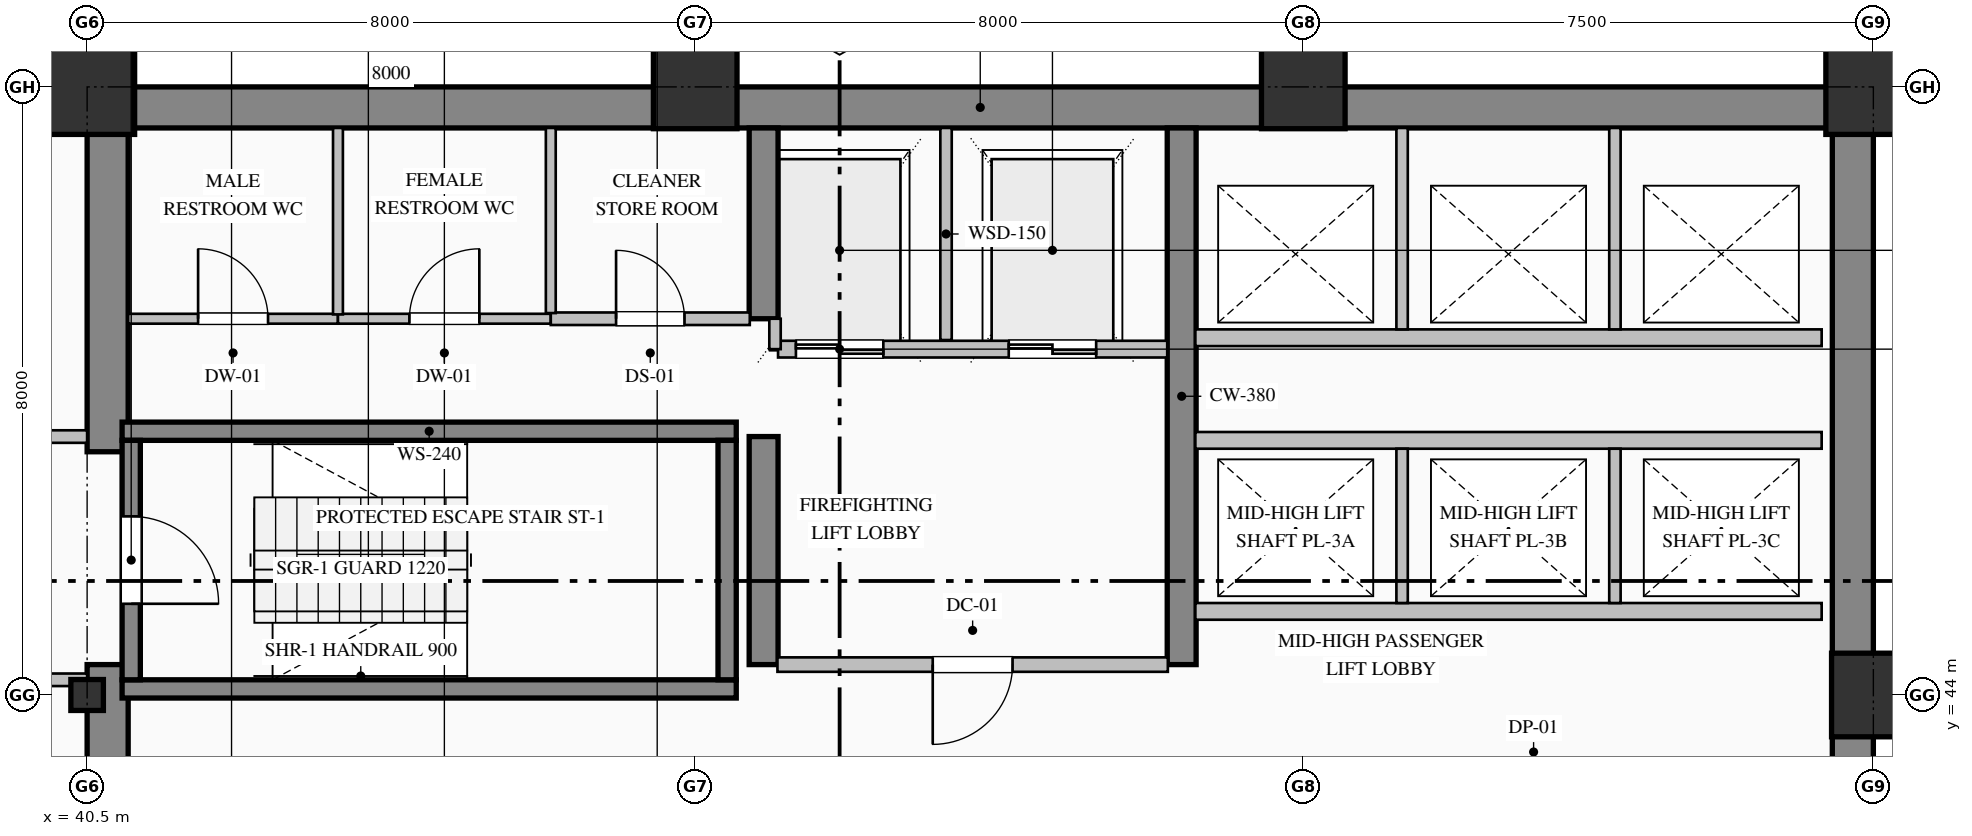
"""IFC4 building model, lengths in metres.
Left out: names, types, materials, properties, quantities, classifications, styles, units other than length and angle.
Written with IfcOpenShell. Run it as: python <this file> out.ifc"""

import sys

from ifc_helpers import new_model, si_unit, direction, frame, frame_2d, origin, origin_2d, place, context, subcontext, project, spatial, rectangle, hollow_rectangle, i_section, extrude, element, fill, save


model = new_model("IFC4")
c1 = context("Model", 3, precision=1e-05, world=origin(), true_north=direction((0.0, 1.0)))
c2 = subcontext(c1, "Body", "Model", "MODEL_VIEW")
j1 = project(units=[si_unit("LENGTHUNIT", "METRE"), si_unit("PLANEANGLEUNIT", "RADIAN")], contexts=[c1])
p1 = place(None, origin())
s1 = spatial("IfcSite", under=j1, at=p1, CompositionType="ELEMENT")
p2 = place(p1, origin())
s2 = spatial("IfcBuilding", under=s1, at=p2, CompositionType="ELEMENT")
p3 = place(p2, frame((0.0, 0.0, 104.2)))
s3 = spatial("IfcBuildingStorey", under=s2, at=p3, CompositionType="ELEMENT", Elevation=104.2)
p4 = place(p3, frame((40.5, 51.73, 0.0), z_axis=(0.0, 0.0, 1.0), x_axis=(1.0, 0.0, 0.0)))
e1 = element("IfcWall", 1, at=p4, inside=s3, PredefinedType="SHEAR", context=c2, shape_type="SweptSolid", body=[
    extrude(rectangle(XDim=23.5, YDim=0.54, at=frame_2d((11.75, 0.0))), origin(), (0.0, 0.0, 1.0), 3.65),
])
p5 = place(p3, frame((63.73, 36.32, 0.0), z_axis=(0.0, 0.0, 1.0), x_axis=(0.0, 1.0, 0.0)))
e2 = element("IfcWall", 2, at=p5, inside=s3, PredefinedType="SHEAR", context=c2, shape_type="SweptSolid", body=[
    extrude(rectangle(XDim=15.14, YDim=0.54, at=frame_2d((7.57, 0.0))), origin(), (0.0, 0.0, 1.0), 3.65),
])
p6 = place(p3, frame((40.77, 36.54, 0.0), z_axis=(0.0, 0.0, 1.0), x_axis=(0.0, 1.0, 0.0)))
e3 = element("IfcWall", 3, at=p6, inside=s3, PredefinedType="SHEAR", context=c2, shape_type="SweptSolid", body=[
    extrude(rectangle(XDim=7.86, YDim=0.54, at=frame_2d((3.93, 0.0))), origin(), (0.0, 0.0, 1.0), 3.65),
])
p7 = place(p3, frame((40.77, 47.2, 0.0), z_axis=(0.0, 0.0, 1.0), x_axis=(0.0, 1.0, 0.0)))
e4 = element("IfcWall", 4, at=p7, inside=s3, PredefinedType="SHEAR", context=c2, shape_type="SweptSolid", body=[
    extrude(rectangle(XDim=4.26, YDim=0.54, at=frame_2d((2.13, 0.0))), origin(), (0.0, 0.0, 1.0), 3.65),
])
p8 = place(p3, frame((49.4, 44.4, 0.0), z_axis=(0.0, 0.0, 1.0), x_axis=(0.0, 1.0, 0.0)))
e5 = element("IfcWall", 5, at=p8, inside=s3, PredefinedType="SHEAR", context=c2, shape_type="SweptSolid", body=[
    extrude(rectangle(XDim=3.0, YDim=0.38, at=frame_2d((1.5, 0.0))), origin(), (0.0, 0.0, 1.0), 3.65),
])
p9 = place(p3, frame((49.4, 48.95, 0.0), z_axis=(0.0, 0.0, 1.0), x_axis=(0.0, 1.0, 0.0)))
e6 = element("IfcWall", 6, at=p9, inside=s3, PredefinedType="SHEAR", context=c2, shape_type="SweptSolid", body=[
    extrude(rectangle(XDim=2.51, YDim=0.38, at=frame_2d((1.255, 0.0))), origin(), (0.0, 0.0, 1.0), 3.65),
])
p10 = place(p3, frame((54.9, 44.4, 0.0), z_axis=(0.0, 0.0, 1.0), x_axis=(0.0, 1.0, 0.0)))
e7 = element("IfcWall", 7, at=p10, inside=s3, PredefinedType="SHEAR", context=c2, shape_type="SweptSolid", body=[
    extrude(rectangle(XDim=7.06, YDim=0.38, at=frame_2d((3.53, 0.0))), origin(), (0.0, 0.0, 1.0), 3.65),
])
p11 = place(p3, frame((40.5, 44.0, 0.0), z_axis=(0.0, 0.0, 1.0), x_axis=(1.0, 0.0, 0.0)))
e8 = element("IfcColumn", 8, at=p11, inside=s3, PredefinedType="COLUMN", context=c2, shape_type="SweptSolid", body=[
    extrude(i_section(OverallWidth=0.407, OverallDepth=0.428, WebThickness=0.02, FlangeThickness=0.035, FilletRadius=0.022, at=origin_2d()), origin(), (0.0, 0.0, 1.0), 4.0),
])
p12 = place(p3, frame((40.5, 52.0, 0.0), z_axis=(0.0, 0.0, 1.0), x_axis=(1.0, 0.0, 0.0)))
e9 = element("IfcColumn", 9, at=p12, inside=s3, PredefinedType="COLUMN", context=c2, shape_type="SweptSolid", body=[
    extrude(hollow_rectangle(XDim=1.25, YDim=1.25, WallThickness=0.045, at=origin_2d()), origin(), (0.0, 0.0, 1.0), 4.0),
])
for number, where, z_axis, x_axis in (
    (10, (48.5, 52.0, 0.0), (0.0, 0.0, 1.0), (1.0, 0.0, 0.0)),
    (11, (56.5, 52.0, 0.0), (0.0, 0.0, 1.0), (1.0, 0.0, 0.0)),
    (12, (64.0, 44.0, 0.0), (0.0, 0.0, 1.0), (1.0, 0.0, 0.0)),
):
    element("IfcColumn", number, at=place(p3, frame(where, z_axis=z_axis, x_axis=x_axis)), inside=s3, PredefinedType="COLUMN", context=c2, shape_type="SweptSolid", body=[
        extrude(hollow_rectangle(XDim=1.1, YDim=1.1, WallThickness=0.04, at=origin_2d()), origin(), (0.0, 0.0, 1.0), 4.0),
    ])
p13 = place(p3, frame((64.0, 52.0, 0.0), z_axis=(0.0, 0.0, 1.0), x_axis=(1.0, 0.0, 0.0)))
e13 = element("IfcColumn", 13, at=p13, inside=s3, PredefinedType="COLUMN", context=c2, shape_type="SweptSolid", body=[
    extrude(hollow_rectangle(XDim=1.25, YDim=1.25, WallThickness=0.045, at=origin_2d()), origin(), (0.0, 0.0, 1.0), 4.0),
])
p14 = place(p3, frame((4.0, 51.82, 0.0), z_axis=(0.0, 0.0, 1.0), x_axis=(1.0, 0.0, 0.0)))
e14 = element("IfcWall", 14, at=p14, inside=s3, PredefinedType="SOLIDWALL", context=c2, shape_type="SweptSolid", body=[
    extrude(rectangle(XDim=36.52, YDim=0.36, at=frame_2d((18.26, 0.0))), origin(), (0.0, 0.0, 1.0), 3.15),
])
p15 = place(p14, frame((6.15, 0.0, 0.85)))
e15 = element("IfcOpeningElement", 15, at=p15, cuts=e14, PredefinedType="OPENING", context=c2, shape_type="SweptSolid", body=[
    extrude(rectangle(XDim=2.1, YDim=2.05, at=frame_2d((1.05, 1.025))), frame((0.0, 0.19, 0.0), z_axis=(0.0, -1.0, 0.0), x_axis=(1.0, 0.0, 0.0)), (0.0, 0.0, 1.0), 0.38),
])
p16 = place(p14, frame((10.2, 0.0, 0.7)))
e16 = element("IfcOpeningElement", 16, at=p16, cuts=e14, PredefinedType="OPENING", context=c2, shape_type="SweptSolid", body=[
    extrude(rectangle(XDim=1.2, YDim=1.85, at=frame_2d((0.6, 0.925))), frame((0.0, 0.19, 0.0), z_axis=(0.0, -1.0, 0.0), x_axis=(1.0, 0.0, 0.0)), (0.0, 0.0, 1.0), 0.38),
])
p17 = place(p14, frame((16.95, 0.0, 0.85)))
e17 = element("IfcOpeningElement", 17, at=p17, cuts=e14, PredefinedType="OPENING", context=c2, shape_type="SweptSolid", body=[
    extrude(rectangle(XDim=2.1, YDim=2.05, at=frame_2d((1.05, 1.025))), frame((0.0, 0.19, 0.0), z_axis=(0.0, -1.0, 0.0), x_axis=(1.0, 0.0, 0.0)), (0.0, 0.0, 1.0), 0.38),
])
p18 = place(p14, frame((31.8, 0.0, 0.7)))
e18 = element("IfcOpeningElement", 18, at=p18, cuts=e14, PredefinedType="OPENING", context=c2, shape_type="SweptSolid", body=[
    extrude(rectangle(XDim=1.2, YDim=1.85, at=frame_2d((0.6, 0.925))), frame((0.0, 0.19, 0.0), z_axis=(0.0, -1.0, 0.0), x_axis=(1.0, 0.0, 0.0)), (0.0, 0.0, 1.0), 0.38),
])
for number, where, z_axis, x_axis in (
    (19, (40.96, 47.47, 0.0), (0.0, 0.0, 1.0), (1.0, 0.0, 0.0)),
    (20, (49.04, 44.08, 0.0), (0.0, 0.0, 1.0), (-1.0, 0.0, 0.0)),
):
    element("IfcWall", number, at=place(p3, frame(where, z_axis=z_axis, x_axis=x_axis)), inside=s3, PredefinedType="SOLIDWALL", context=c2, shape_type="SweptSolid", body=[
        extrude(rectangle(XDim=8.08, YDim=0.24, at=frame_2d((4.04, 0.0))), origin(), (0.0, 0.0, 1.0), 4.0),
    ])
p19 = place(p3, frame((41.08, 47.35, 0.0), z_axis=(0.0, 0.0, 1.0), x_axis=(0.0, -1.0, 0.0)))
e21 = element("IfcWall", 21, at=p19, inside=s3, PredefinedType="SOLIDWALL", context=c2, shape_type="SweptSolid", body=[
    extrude(rectangle(XDim=3.15, YDim=0.24, at=frame_2d((1.575, 0.0))), origin(), (0.0, 0.0, 1.0), 4.0),
])
p20 = place(p19, frame((1.0, 0.0, 0.0)))
e22 = element("IfcOpeningElement", 22, at=p20, cuts=e21, PredefinedType="OPENING", context=c2, shape_type="SweptSolid", body=[
    extrude(rectangle(XDim=1.15, YDim=2.2, at=frame_2d((0.575, 1.1))), frame((0.0, 0.13, 0.0), z_axis=(0.0, -1.0, 0.0), x_axis=(1.0, 0.0, 0.0)), (0.0, 0.0, 1.0), 0.26),
])
p21 = place(p3, frame((48.92, 44.2, 0.0), z_axis=(0.0, 0.0, 1.0), x_axis=(0.0, 1.0, 0.0)))
e23 = element("IfcWall", 23, at=p21, inside=s3, PredefinedType="SOLIDWALL", context=c2, shape_type="SweptSolid", body=[
    extrude(rectangle(XDim=3.15, YDim=0.24, at=frame_2d((1.575, 0.0))), origin(), (0.0, 0.0, 1.0), 4.0),
])
p22 = place(p3, frame((54.71, 48.55, 0.0), z_axis=(0.0, 0.0, 1.0), x_axis=(-1.0, 0.0, 0.0)))
e24 = element("IfcWall", 24, at=p22, inside=s3, PredefinedType="PARTITIONING", context=c2, shape_type="SweptSolid", body=[
    extrude(rectangle(XDim=5.12, YDim=0.22, at=frame_2d((2.56, 0.0))), origin(), (0.0, 0.0, 1.0), 3.65),
])
p23 = place(p22, frame((3.735, 0.0, 0.0)))
e25 = element("IfcOpeningElement", 25, at=p23, cuts=e24, PredefinedType="OPENING", context=c2, shape_type="SweptSolid", body=[
    extrude(rectangle(XDim=1.15, YDim=2.2, at=frame_2d((0.575, 1.1))), frame((0.0, 0.12, 0.0), z_axis=(0.0, -1.0, 0.0), x_axis=(1.0, 0.0, 0.0)), (0.0, 0.0, 1.0), 0.24),
])
p24 = place(p22, frame((0.935, 0.0, 0.0)))
e26 = element("IfcOpeningElement", 26, at=p24, cuts=e24, PredefinedType="OPENING", context=c2, shape_type="SweptSolid", body=[
    extrude(rectangle(XDim=1.15, YDim=2.2, at=frame_2d((0.575, 1.1))), frame((0.0, 0.12, 0.0), z_axis=(0.0, -1.0, 0.0), x_axis=(1.0, 0.0, 0.0)), (0.0, 0.0, 1.0), 0.24),
])
p25 = place(p3, frame((51.8, 48.67, 0.0), z_axis=(0.0, 0.0, 1.0), x_axis=(0.0, 1.0, 0.0)))
e27 = element("IfcWall", 27, at=p25, inside=s3, PredefinedType="PARTITIONING", context=c2, shape_type="SweptSolid", body=[
    extrude(rectangle(XDim=2.79, YDim=0.15, at=frame_2d((1.395, 0.0))), origin(), (0.0, 0.0, 1.0), 3.65),
])
p26 = place(p3, frame((49.55, 48.55, 0.0), z_axis=(0.0, 0.0, 1.0), x_axis=(0.0, 1.0, 0.0)))
e28 = element("IfcWall", 28, at=p26, inside=s3, PredefinedType="PARTITIONING", context=c2, shape_type="SweptSolid", body=[
    extrude(rectangle(XDim=0.4, YDim=0.15, at=frame_2d((0.2, 0.0))), origin(), (0.0, 0.0, 1.0), 3.65),
])
for number, where, z_axis, x_axis in (
    (29, (63.32, 45.1, 0.0), (0.0, 0.0, 1.0), (-1.0, 0.0, 0.0)),
    (30, (55.08, 47.35, 0.0), (0.0, 0.0, 1.0), (1.0, 0.0, 0.0)),
):
    element("IfcWall", number, at=place(p3, frame(where, z_axis=z_axis, x_axis=x_axis)), inside=s3, PredefinedType="PARTITIONING", context=c2, shape_type="SweptSolid", body=[
        extrude(rectangle(XDim=8.24, YDim=0.22, at=frame_2d((4.12, 0.0))), origin(), (0.0, 0.0, 1.0), 3.65),
    ])
for number, where, z_axis, x_axis in (
    (31, (57.8, 45.21, 0.0), (0.0, 0.0, 1.0), (0.0, 1.0, 0.0)),
    (32, (60.6, 45.21, 0.0), (0.0, 0.0, 1.0), (0.0, 1.0, 0.0)),
):
    element("IfcWall", number, at=place(p3, frame(where, z_axis=z_axis, x_axis=x_axis)), inside=s3, PredefinedType="PARTITIONING", context=c2, shape_type="SweptSolid", body=[
        extrude(rectangle(XDim=2.03, YDim=0.15, at=frame_2d((1.015, 0.0))), origin(), (0.0, 0.0, 1.0), 3.65),
    ])
p27 = place(p3, frame((63.32, 48.7, 0.0), z_axis=(0.0, 0.0, 1.0), x_axis=(-1.0, 0.0, 0.0)))
e33 = element("IfcWall", 33, at=p27, inside=s3, PredefinedType="PARTITIONING", context=c2, shape_type="SweptSolid", body=[
    extrude(rectangle(XDim=8.24, YDim=0.22, at=frame_2d((4.12, 0.0))), origin(), (0.0, 0.0, 1.0), 3.65),
])
for number, where, z_axis, x_axis in (
    (34, (57.8, 48.81, 0.0), (0.0, 0.0, 1.0), (0.0, 1.0, 0.0)),
    (35, (60.6, 48.81, 0.0), (0.0, 0.0, 1.0), (0.0, 1.0, 0.0)),
):
    element("IfcWall", number, at=place(p3, frame(where, z_axis=z_axis, x_axis=x_axis)), inside=s3, PredefinedType="PARTITIONING", context=c2, shape_type="SweptSolid", body=[
        extrude(rectangle(XDim=2.65, YDim=0.15, at=frame_2d((1.325, 0.0))), origin(), (0.0, 0.0, 1.0), 3.65),
    ])
p28 = place(p3, frame((37.8, 47.4, 0.0), z_axis=(0.0, 0.0, 1.0), x_axis=(1.0, 0.0, 0.0)))
e36 = element("IfcWall", 36, at=p28, inside=s3, PredefinedType="PARTITIONING", context=c2, shape_type="SweptSolid", body=[
    extrude(rectangle(XDim=2.7, YDim=0.165, at=frame_2d((1.35, 0.0))), origin(), (0.0, 0.0, 1.0), 3.65),
])
p29 = place(p28, frame((0.825, 0.0, 0.0)))
e37 = element("IfcOpeningElement", 37, at=p29, cuts=e36, PredefinedType="OPENING", context=c2, shape_type="SweptSolid", body=[
    extrude(rectangle(XDim=1.05, YDim=2.15, at=frame_2d((0.525, 1.075))), frame((0.0, 0.093, 0.0), z_axis=(0.0, -1.0, 0.0), x_axis=(1.0, 0.0, 0.0)), (0.0, 0.0, 1.0), 0.185),
])
p30 = place(p3, frame((40.5, 44.2, 0.0), z_axis=(0.0, 0.0, 1.0), x_axis=(-1.0, 0.0, 0.0)))
e38 = element("IfcWall", 38, at=p30, inside=s3, PredefinedType="PARTITIONING", context=c2, shape_type="SweptSolid", body=[
    extrude(rectangle(XDim=2.7, YDim=0.165, at=frame_2d((1.35, 0.0))), origin(), (0.0, 0.0, 1.0), 3.65),
])
p31 = place(p30, frame((0.825, 0.0, 0.0)))
e39 = element("IfcOpeningElement", 39, at=p31, cuts=e38, PredefinedType="OPENING", context=c2, shape_type="SweptSolid", body=[
    extrude(rectangle(XDim=1.05, YDim=2.15, at=frame_2d((0.525, 1.075))), frame((0.0, 0.093, 0.0), z_axis=(0.0, -1.0, 0.0), x_axis=(1.0, 0.0, 0.0)), (0.0, 0.0, 1.0), 0.185),
])
p32 = place(p3, frame((41.04, 48.95, 0.0), z_axis=(0.0, 0.0, 1.0), x_axis=(1.0, 0.0, 0.0)))
e40 = element("IfcWall", 40, at=p32, inside=s3, PredefinedType="PARTITIONING", context=c2, shape_type="SweptSolid", body=[
    extrude(rectangle(XDim=2.76, YDim=0.13, at=frame_2d((1.38, 0.0))), origin(), (0.0, 0.0, 1.0), 3.65),
])
p33 = place(p32, frame((0.92, 0.0, 0.0)))
e41 = element("IfcOpeningElement", 41, at=p33, cuts=e40, PredefinedType="OPENING", context=c2, shape_type="SweptSolid", body=[
    extrude(rectangle(XDim=0.92, YDim=2.15, at=frame_2d((0.46, 1.075))), frame((0.0, 0.075, 0.0), z_axis=(0.0, -1.0, 0.0), x_axis=(1.0, 0.0, 0.0)), (0.0, 0.0, 1.0), 0.15),
])
p34 = place(p3, frame((43.8, 48.95, 0.0), z_axis=(0.0, 0.0, 1.0), x_axis=(1.0, 0.0, 0.0)))
e42 = element("IfcWall", 42, at=p34, inside=s3, PredefinedType="PARTITIONING", context=c2, shape_type="SweptSolid", body=[
    extrude(rectangle(XDim=2.8, YDim=0.13, at=frame_2d((1.4, 0.0))), origin(), (0.0, 0.0, 1.0), 3.65),
])
p35 = place(p34, frame((0.94, 0.0, 0.0)))
e43 = element("IfcOpeningElement", 43, at=p35, cuts=e42, PredefinedType="OPENING", context=c2, shape_type="SweptSolid", body=[
    extrude(rectangle(XDim=0.92, YDim=2.15, at=frame_2d((0.46, 1.075))), frame((0.0, 0.075, 0.0), z_axis=(0.0, -1.0, 0.0), x_axis=(1.0, 0.0, 0.0)), (0.0, 0.0, 1.0), 0.15),
])
p36 = place(p3, frame((46.6, 48.95, 0.0), z_axis=(0.0, 0.0, 1.0), x_axis=(1.0, 0.0, 0.0)))
e44 = element("IfcWall", 44, at=p36, inside=s3, PredefinedType="PARTITIONING", context=c2, shape_type="SweptSolid", body=[
    extrude(rectangle(XDim=2.618, YDim=0.165, at=frame_2d((1.309, 0.0))), origin(), (0.0, 0.0, 1.0), 3.65),
])
p37 = place(p36, frame((0.859, 0.0, 0.0)))
e45 = element("IfcOpeningElement", 45, at=p37, cuts=e44, PredefinedType="OPENING", context=c2, shape_type="SweptSolid", body=[
    extrude(rectangle(XDim=0.9, YDim=2.15, at=frame_2d((0.45, 1.075))), frame((0.0, 0.093, 0.0), z_axis=(0.0, -1.0, 0.0), x_axis=(1.0, 0.0, 0.0)), (0.0, 0.0, 1.0), 0.185),
])
p38 = place(p3, frame((54.718, 44.4, 0.0), z_axis=(0.0, 0.0, 1.0), x_axis=(-1.0, 0.0, 0.0)))
e46 = element("IfcWall", 46, at=p38, inside=s3, PredefinedType="PARTITIONING", context=c2, shape_type="SweptSolid", body=[
    extrude(rectangle(XDim=5.136, YDim=0.19, at=frame_2d((2.568, 0.0))), origin(), (0.0, 0.0, 1.0), 3.65),
])
p39 = place(p38, frame((2.043, 0.0, 0.0)))
e47 = element("IfcOpeningElement", 47, at=p39, cuts=e46, PredefinedType="OPENING", context=c2, shape_type="SweptSolid", body=[
    extrude(rectangle(XDim=1.05, YDim=2.15, at=frame_2d((0.525, 1.075))), frame((0.0, 0.105, 0.0), z_axis=(0.0, -1.0, 0.0), x_axis=(1.0, 0.0, 0.0)), (0.0, 0.0, 1.0), 0.21),
])
p40 = place(p3, frame((43.8, 51.46, 0.0), z_axis=(0.0, 0.0, 1.0), x_axis=(0.0, -1.0, 0.0)))
e48 = element("IfcWall", 48, at=p40, inside=s3, PredefinedType="PARTITIONING", context=c2, shape_type="SweptSolid", body=[
    extrude(rectangle(XDim=2.453, YDim=0.13, at=frame_2d((1.227, 0.0))), origin(), (0.0, 0.0, 1.0), 3.65),
])
p41 = place(p3, frame((46.6, 51.46, 0.0), z_axis=(0.0, 0.0, 1.0), x_axis=(0.0, -1.0, 0.0)))
e49 = element("IfcWall", 49, at=p41, inside=s3, PredefinedType="PARTITIONING", context=c2, shape_type="SweptSolid", body=[
    extrude(rectangle(XDim=2.436, YDim=0.13, at=frame_2d((1.218, 0.0))), origin(), (0.0, 0.0, 1.0), 3.65),
])
p42 = place(p20, origin())
e50 = element("IfcDoor", 50, at=p42, inside=s3, OperationType="SINGLE_SWING_RIGHT", PredefinedType="DOOR", context=c2, shape_type="SweptSolid", body=[
    extrude(rectangle(XDim=1.15, YDim=2.2, at=frame_2d((0.575, 1.1))), frame((0.0, 0.025, 0.0), z_axis=(0.0, -1.0, 0.0), x_axis=(1.0, 0.0, 0.0)), (0.0, 0.0, 1.0), 0.05),
])
fill(e22, e50)
p43 = place(p23, origin())
e51 = element("IfcDoor", 51, at=p43, inside=s3, OperationType="DOUBLE_DOOR_SLIDING", PredefinedType="DOOR", context=c2, shape_type="SweptSolid", body=[
    extrude(rectangle(XDim=1.15, YDim=2.2, at=frame_2d((0.575, 1.1))), frame((0.0, 0.025, 0.0), z_axis=(0.0, -1.0, 0.0), x_axis=(1.0, 0.0, 0.0)), (0.0, 0.0, 1.0), 0.05),
])
fill(e25, e51)
p44 = place(p24, origin())
e52 = element("IfcDoor", 52, at=p44, inside=s3, OperationType="DOUBLE_DOOR_SLIDING", PredefinedType="DOOR", context=c2, shape_type="SweptSolid", body=[
    extrude(rectangle(XDim=1.15, YDim=2.2, at=frame_2d((0.575, 1.1))), frame((0.0, 0.025, 0.0), z_axis=(0.0, -1.0, 0.0), x_axis=(1.0, 0.0, 0.0)), (0.0, 0.0, 1.0), 0.05),
])
fill(e26, e52)
p45 = place(p39, origin())
e53 = element("IfcDoor", 53, at=p45, inside=s3, OperationType="SINGLE_SWING_RIGHT", PredefinedType="DOOR", context=c2, shape_type="SweptSolid", body=[
    extrude(rectangle(XDim=1.05, YDim=2.15, at=frame_2d((0.525, 1.075))), frame((0.0, 0.025, 0.0), z_axis=(0.0, -1.0, 0.0), x_axis=(1.0, 0.0, 0.0)), (0.0, 0.0, 1.0), 0.05),
])
fill(e47, e53)
p46 = place(p33, origin())
e54 = element("IfcDoor", 54, at=p46, inside=s3, OperationType="SINGLE_SWING_LEFT", PredefinedType="DOOR", context=c2, shape_type="SweptSolid", body=[
    extrude(rectangle(XDim=0.92, YDim=2.15, at=frame_2d((0.46, 1.075))), frame((0.0, 0.025, 0.0), z_axis=(0.0, -1.0, 0.0), x_axis=(1.0, 0.0, 0.0)), (0.0, 0.0, 1.0), 0.05),
])
fill(e41, e54)
p47 = place(p35, origin())
e55 = element("IfcDoor", 55, at=p47, inside=s3, OperationType="SINGLE_SWING_RIGHT", PredefinedType="DOOR", context=c2, shape_type="SweptSolid", body=[
    extrude(rectangle(XDim=0.92, YDim=2.15, at=frame_2d((0.46, 1.075))), frame((0.0, 0.025, 0.0), z_axis=(0.0, -1.0, 0.0), x_axis=(1.0, 0.0, 0.0)), (0.0, 0.0, 1.0), 0.05),
])
fill(e43, e55)
p48 = place(p37, origin())
e56 = element("IfcDoor", 56, at=p48, inside=s3, OperationType="SINGLE_SWING_LEFT", PredefinedType="DOOR", context=c2, shape_type="SweptSolid", body=[
    extrude(rectangle(XDim=0.9, YDim=2.15, at=frame_2d((0.45, 1.075))), frame((0.0, 0.025, 0.0), z_axis=(0.0, -1.0, 0.0), x_axis=(1.0, 0.0, 0.0)), (0.0, 0.0, 1.0), 0.05),
])
fill(e45, e56)
save(model, sys.argv[1])
